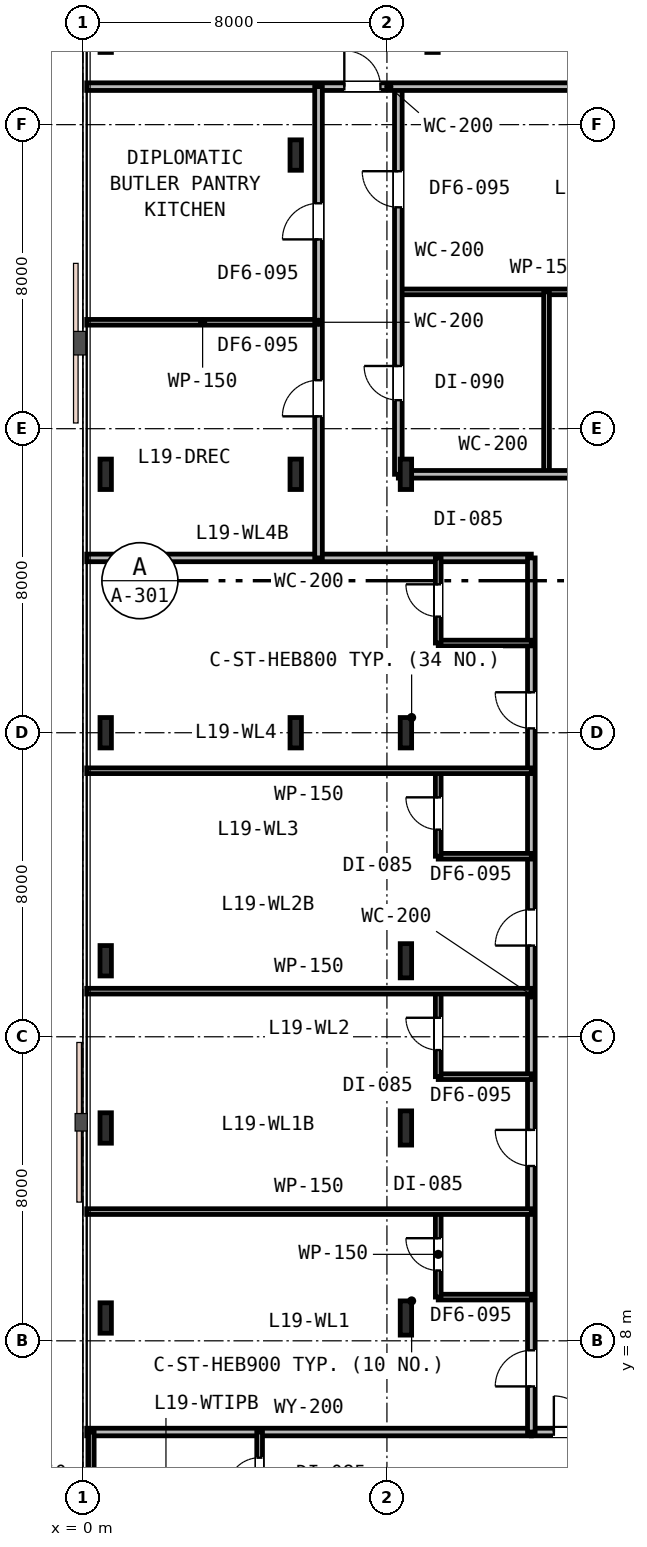
"""IFC4 building model, lengths in metres.
Left out: names, types, materials, properties, quantities, classifications, styles, units other than length and angle.
Written with IfcOpenShell. Run it as: python <this file> out.ifc"""

import sys

from ifc_helpers import new_model, si_unit, direction, frame, frame_2d, origin, origin_2d, place, context, subcontext, project, spatial, rectangle, i_section, extrude, element, fill, save


model = new_model("IFC4")
c1 = context("Model", 3, precision=1e-05, world=origin(), true_north=direction((0.0, 1.0)))
c2 = subcontext(c1, "Body", "Model", "MODEL_VIEW")
j1 = project(units=[si_unit("LENGTHUNIT", "METRE"), si_unit("PLANEANGLEUNIT", "RADIAN")], contexts=[c1])
p1 = place(None, origin())
s1 = spatial("IfcSite", under=j1, at=p1, CompositionType="ELEMENT")
p2 = place(p1, origin())
s2 = spatial("IfcBuilding", under=s1, at=p2, CompositionType="ELEMENT")
p3 = place(p2, frame((0.0, 0.0, 76.2)))
s3 = spatial("IfcBuildingStorey", under=s2, at=p3, CompositionType="ELEMENT", Elevation=76.2)
for number, where, z_axis, x_axis in (
    (1, (8.5, 24.0, 0.0), (0.0, 0.0, 1.0), (1.0, 0.0, 0.0)),
    (2, (5.6, 24.0, 0.0), (0.0, 0.0, 1.0), (1.0, 0.0, 0.0)),
    (3, (5.6, 30.8, 0.0), (0.0, 0.0, 1.0), (1.0, 0.0, 0.0)),
    (4, (5.6, 39.2, 0.0), (0.0, 0.0, 1.0), (1.0, 0.0, 0.0)),
    (5, (8.5, 30.8, 0.0), (0.0, 0.0, 1.0), (1.0, 0.0, 0.0)),
    (6, (9.2, 42.3, 0.0), (0.0, 0.0, 1.0), (1.0, 0.0, 0.0)),
    (7, (0.6, 24.0, 0.0), (0.0, 0.0, 1.0), (1.0, 0.0, 0.0)),
    (8, (0.6, 30.8, 0.0), (0.0, 0.0, 1.0), (1.0, 0.0, 0.0)),
    (9, (0.6, 42.3, 0.0), (0.0, 0.0, 1.0), (1.0, 0.0, 0.0)),
    (10, (0.6, 8.6, 0.0), (0.0, 0.0, 1.0), (1.0, 0.0, 0.0)),
    (11, (0.6, 13.6, 0.0), (0.0, 0.0, 1.0), (1.0, 0.0, 0.0)),
    (12, (0.6, 18.0, 0.0), (0.0, 0.0, 1.0), (1.0, 0.0, 0.0)),
):
    element("IfcColumn", number, at=place(p3, frame(where, z_axis=z_axis, x_axis=x_axis)), inside=s3, PredefinedType="COLUMN", context=c2, shape_type="SweptSolid", body=[
        extrude(i_section(OverallWidth=0.3, OverallDepth=0.8, WebThickness=0.018, FlangeThickness=0.033, FilletRadius=0.03, at=origin_2d()), origin(), (0.0, 0.0, 1.0), 3.6),
    ])
for number, where, z_axis, x_axis in (
    (13, (8.5, 8.6, 0.0), (0.0, 0.0, 1.0), (1.0, 0.0, 0.0)),
    (14, (8.5, 13.6, 0.0), (0.0, 0.0, 1.0), (1.0, 0.0, 0.0)),
    (15, (8.5, 18.0, 0.0), (0.0, 0.0, 1.0), (1.0, 0.0, 0.0)),
):
    element("IfcColumn", number, at=place(p3, frame(where, z_axis=z_axis, x_axis=x_axis)), inside=s3, PredefinedType="COLUMN", context=c2, shape_type="SweptSolid", body=[
        extrude(i_section(OverallWidth=0.3, OverallDepth=0.9, WebThickness=0.018, FlangeThickness=0.035, FilletRadius=0.03, at=origin_2d()), origin(), (0.0, 0.0, 1.0), 3.6),
    ])
p4 = place(p3, frame((0.1, 28.6, 0.0), z_axis=(0.0, 0.0, 1.0), x_axis=(1.0, 0.0, 0.0)))
e16 = element("IfcWall", 16, at=p4, inside=s3, PredefinedType="PARTITIONING", context=c2, shape_type="SweptSolid", body=[
    extrude(rectangle(XDim=11.7, YDim=0.2, at=frame_2d((5.85, 0.0))), origin(), (0.0, 0.0, 1.0), 2.74),
])
p5 = place(p3, frame((8.3, 35.6, 0.0), z_axis=(0.0, 0.0, 1.0), x_axis=(1.0, 0.0, 0.0)))
e17 = element("IfcWall", 17, at=p5, inside=s3, PredefinedType="PARTITIONING", context=c2, shape_type="SweptSolid", body=[
    extrude(rectangle(XDim=7.7, YDim=0.15, at=frame_2d((3.85, 0.0))), origin(), (0.0, 0.0, 1.0), 2.74),
])
p6 = place(p3, frame((12.2, 30.8, 0.0), z_axis=(0.0, 0.0, 1.0), x_axis=(0.0, 1.0, 0.0)))
e18 = element("IfcWall", 18, at=p6, inside=s3, PredefinedType="PARTITIONING", context=c2, shape_type="SweptSolid", body=[
    extrude(rectangle(XDim=4.8, YDim=0.15, at=frame_2d((2.4, 0.0))), origin(), (0.0, 0.0, 1.0), 2.74),
])
p7 = place(p3, frame((8.3, 30.8, 0.0), z_axis=(0.0, 0.0, 1.0), x_axis=(1.0, 0.0, 0.0)))
e19 = element("IfcWall", 19, at=p7, inside=s3, PredefinedType="PARTITIONING", context=c2, shape_type="SweptSolid", body=[
    extrude(rectangle(XDim=7.7, YDim=0.2, at=frame_2d((3.85, 0.0))), origin(), (0.0, 0.0, 1.0), 2.74),
])
p8 = place(p7, frame((5.325, 0.0, 0.0)))
e20 = element("IfcOpeningElement", 20, at=p8, cuts=e19, PredefinedType="OPENING", context=c2, shape_type="SweptSolid", body=[
    extrude(rectangle(XDim=0.95, YDim=2.15, at=frame_2d((0.475, 1.075))), frame((0.0, 0.11, 0.0), z_axis=(0.0, -1.0, 0.0), x_axis=(1.0, 0.0, 0.0)), (0.0, 0.0, 1.0), 0.22),
])
p9 = place(p3, frame((8.3, 30.8, 0.0), z_axis=(0.0, 0.0, 1.0), x_axis=(0.0, 1.0, 0.0)))
e21 = element("IfcWall", 21, at=p9, inside=s3, PredefinedType="PARTITIONING", context=c2, shape_type="SweptSolid", body=[
    extrude(rectangle(XDim=10.2, YDim=0.2, at=frame_2d((5.1, 0.0))), origin(), (0.0, 0.0, 1.0), 2.74),
])
p10 = place(p9, frame((1.95, 0.0, 0.0)))
e22 = element("IfcOpeningElement", 22, at=p10, cuts=e21, PredefinedType="OPENING", context=c2, shape_type="SweptSolid", body=[
    extrude(rectangle(XDim=0.9, YDim=2.15, at=frame_2d((0.45, 1.075))), frame((0.0, 0.11, 0.0), z_axis=(0.0, -1.0, 0.0), x_axis=(1.0, 0.0, 0.0)), (0.0, 0.0, 1.0), 0.22),
])
p11 = place(p9, frame((7.025, 0.0, 0.0)))
e23 = element("IfcOpeningElement", 23, at=p11, cuts=e21, PredefinedType="OPENING", context=c2, shape_type="SweptSolid", body=[
    extrude(rectangle(XDim=0.95, YDim=2.15, at=frame_2d((0.475, 1.075))), frame((0.0, 0.11, 0.0), z_axis=(0.0, -1.0, 0.0), x_axis=(1.0, 0.0, 0.0)), (0.0, 0.0, 1.0), 0.22),
])
p12 = place(p3, frame((0.1, 41.0, 0.0), z_axis=(0.0, 0.0, 1.0), x_axis=(1.0, 0.0, 0.0)))
e24 = element("IfcWall", 24, at=p12, inside=s3, PredefinedType="PARTITIONING", context=c2, shape_type="SweptSolid", body=[
    extrude(rectangle(XDim=15.9, YDim=0.2, at=frame_2d((7.95, 0.0))), origin(), (0.0, 0.0, 1.0), 2.74),
])
p13 = place(p12, frame((6.779, 0.0, 0.0)))
e25 = element("IfcOpeningElement", 25, at=p13, cuts=e24, PredefinedType="OPENING", context=c2, shape_type="SweptSolid", body=[
    extrude(rectangle(XDim=0.95, YDim=2.15, at=frame_2d((0.475, 1.075))), frame((0.0, 0.11, 0.0), z_axis=(0.0, -1.0, 0.0), x_axis=(1.0, 0.0, 0.0)), (0.0, 0.0, 1.0), 0.22),
])
p14 = place(p3, frame((0.1, 34.8, 0.0), z_axis=(0.0, 0.0, 1.0), x_axis=(1.0, 0.0, 0.0)))
e26 = element("IfcWall", 26, at=p14, inside=s3, PredefinedType="PARTITIONING", context=c2, shape_type="SweptSolid", body=[
    extrude(rectangle(XDim=6.1, YDim=0.15, at=frame_2d((3.05, 0.0))), origin(), (0.0, 0.0, 1.0), 2.74),
])
p15 = place(p3, frame((6.2, 28.6, 0.0), z_axis=(0.0, 0.0, 1.0), x_axis=(0.0, 1.0, 0.0)))
e27 = element("IfcWall", 27, at=p15, inside=s3, PredefinedType="PARTITIONING", context=c2, shape_type="SweptSolid", body=[
    extrude(rectangle(XDim=12.4, YDim=0.2, at=frame_2d((6.2, 0.0))), origin(), (0.0, 0.0, 1.0), 2.74),
])
p16 = place(p15, frame((3.725, 0.0, 0.0)))
e28 = element("IfcOpeningElement", 28, at=p16, cuts=e27, PredefinedType="OPENING", context=c2, shape_type="SweptSolid", body=[
    extrude(rectangle(XDim=0.95, YDim=2.15, at=frame_2d((0.475, 1.075))), frame((0.0, 0.11, 0.0), z_axis=(0.0, -1.0, 0.0), x_axis=(1.0, 0.0, 0.0)), (0.0, 0.0, 1.0), 0.22),
])
p17 = place(p15, frame((8.381, 0.0, 0.0)))
e29 = element("IfcOpeningElement", 29, at=p17, cuts=e27, PredefinedType="OPENING", context=c2, shape_type="SweptSolid", body=[
    extrude(rectangle(XDim=0.95, YDim=2.15, at=frame_2d((0.475, 1.075))), frame((0.0, 0.11, 0.0), z_axis=(0.0, -1.0, 0.0), x_axis=(1.0, 0.0, 0.0)), (0.0, 0.0, 1.0), 0.22),
])
p18 = place(p3, frame((0.1, 5.6, 0.0), z_axis=(0.0, 0.0, 1.0), x_axis=(1.0, 0.0, 0.0)))
e30 = element("IfcWall", 30, at=p18, inside=s3, PredefinedType="PARTITIONING", context=c2, shape_type="SweptSolid", body=[
    extrude(rectangle(XDim=11.7, YDim=0.2, at=frame_2d((5.85, 0.0))), origin(), (0.0, 0.0, 1.0), 2.83),
])
p19 = place(p3, frame((11.8, 5.6, 0.0), z_axis=(0.0, 0.0, 1.0), x_axis=(1.0, 0.0, 0.0)))
e31 = element("IfcWall", 31, at=p19, inside=s3, PredefinedType="PARTITIONING", context=c2, shape_type="SweptSolid", body=[
    extrude(rectangle(XDim=2.2, YDim=0.2, at=frame_2d((1.1, 0.0))), origin(), (0.0, 0.0, 1.0), 3.24),
])
p20 = place(p19, frame((0.593, 0.0, 0.0)))
e32 = element("IfcOpeningElement", 32, at=p20, cuts=e31, PredefinedType="OPENING", context=c2, shape_type="SweptSolid", body=[
    extrude(rectangle(XDim=0.95, YDim=2.15, at=frame_2d((0.475, 1.075))), frame((0.0, 0.11, 0.0), z_axis=(0.0, -1.0, 0.0), x_axis=(1.0, 0.0, 0.0)), (0.0, 0.0, 1.0), 0.22),
])
p21 = place(p3, frame((4.65, 3.4, 0.0), z_axis=(0.0, 0.0, 1.0), x_axis=(0.0, 1.0, 0.0)))
e33 = element("IfcWall", 33, at=p21, inside=s3, PredefinedType="PARTITIONING", context=c2, shape_type="SweptSolid", body=[
    extrude(rectangle(XDim=2.2, YDim=0.15, at=frame_2d((1.1, 0.0))), origin(), (0.0, 0.0, 1.0), 3.24),
])
p22 = place(p21, frame((0.675, 0.0, 0.0)))
e34 = element("IfcOpeningElement", 34, at=p22, cuts=e33, PredefinedType="OPENING", context=c2, shape_type="SweptSolid", body=[
    extrude(rectangle(XDim=0.85, YDim=2.15, at=frame_2d((0.425, 1.075))), frame((0.0, 0.085, 0.0), z_axis=(0.0, -1.0, 0.0), x_axis=(1.0, 0.0, 0.0)), (0.0, 0.0, 1.0), 0.17),
])
p23 = place(p3, frame((0.22, 3.38, 0.0), z_axis=(0.0, 0.0, 1.0), x_axis=(0.0, 1.0, 0.0)))
e35 = element("IfcWall", 35, at=p23, inside=s3, PredefinedType="PARTITIONING", context=c2, shape_type="SweptSolid", body=[
    extrude(rectangle(XDim=2.22, YDim=0.15, at=frame_2d((1.11, 0.0))), origin(), (0.0, 0.0, 1.0), 2.83),
])
p24 = place(p3, frame((11.8, 5.6, 0.0), z_axis=(0.0, 0.0, 1.0), x_axis=(0.0, 1.0, 0.0)))
e36 = element("IfcWall", 36, at=p24, inside=s3, PredefinedType="PARTITIONING", context=c2, shape_type="SweptSolid", body=[
    extrude(rectangle(XDim=23.0, YDim=0.2, at=frame_2d((11.5, 0.0))), origin(), (0.0, 0.0, 1.0), 2.74),
])
p25 = place(p24, frame((1.2, 0.0, 0.0)))
e37 = element("IfcOpeningElement", 37, at=p25, cuts=e36, PredefinedType="OPENING", context=c2, shape_type="SweptSolid", body=[
    extrude(rectangle(XDim=0.95, YDim=2.15, at=frame_2d((0.475, 1.075))), frame((0.0, 0.11, 0.0), z_axis=(0.0, -1.0, 0.0), x_axis=(1.0, 0.0, 0.0)), (0.0, 0.0, 1.0), 0.22),
])
p26 = place(p24, frame((7.0, 0.0, 0.0)))
e38 = element("IfcOpeningElement", 38, at=p26, cuts=e36, PredefinedType="OPENING", context=c2, shape_type="SweptSolid", body=[
    extrude(rectangle(XDim=0.95, YDim=2.15, at=frame_2d((0.475, 1.075))), frame((0.0, 0.11, 0.0), z_axis=(0.0, -1.0, 0.0), x_axis=(1.0, 0.0, 0.0)), (0.0, 0.0, 1.0), 0.22),
])
p27 = place(p24, frame((12.8, 0.0, 0.0)))
e39 = element("IfcOpeningElement", 39, at=p27, cuts=e36, PredefinedType="OPENING", context=c2, shape_type="SweptSolid", body=[
    extrude(rectangle(XDim=0.95, YDim=2.15, at=frame_2d((0.475, 1.075))), frame((0.0, 0.11, 0.0), z_axis=(0.0, -1.0, 0.0), x_axis=(1.0, 0.0, 0.0)), (0.0, 0.0, 1.0), 0.22),
])
p28 = place(p24, frame((18.515, 0.0, 0.0)))
e40 = element("IfcOpeningElement", 40, at=p28, cuts=e36, PredefinedType="OPENING", context=c2, shape_type="SweptSolid", body=[
    extrude(rectangle(XDim=0.95, YDim=2.15, at=frame_2d((0.475, 1.075))), frame((0.0, 0.11, 0.0), z_axis=(0.0, -1.0, 0.0), x_axis=(1.0, 0.0, 0.0)), (0.0, 0.0, 1.0), 0.22),
])
p29 = place(p3, frame((9.35, 9.15, 0.0), z_axis=(0.0, 0.0, 1.0), x_axis=(1.0, 0.0, 0.0)))
e41 = element("IfcWall", 41, at=p29, inside=s3, PredefinedType="PARTITIONING", context=c2, shape_type="SweptSolid", body=[
    extrude(rectangle(XDim=2.45, YDim=0.15, at=frame_2d((1.225, 0.0))), origin(), (0.0, 0.0, 1.0), 2.93),
])
p30 = place(p3, frame((9.35, 9.15, 0.0), z_axis=(0.0, 0.0, 1.0), x_axis=(0.0, 1.0, 0.0)))
e42 = element("IfcWall", 42, at=p30, inside=s3, PredefinedType="PARTITIONING", context=c2, shape_type="SweptSolid", body=[
    extrude(rectangle(XDim=2.25, YDim=0.15, at=frame_2d((1.125, 0.0))), origin(), (0.0, 0.0, 1.0), 3.24),
])
p31 = place(p30, frame((0.7, 0.0, 0.0)))
e43 = element("IfcOpeningElement", 43, at=p31, cuts=e42, PredefinedType="OPENING", context=c2, shape_type="SweptSolid", body=[
    extrude(rectangle(XDim=0.85, YDim=2.15, at=frame_2d((0.425, 1.075))), frame((0.0, 0.085, 0.0), z_axis=(0.0, -1.0, 0.0), x_axis=(1.0, 0.0, 0.0)), (0.0, 0.0, 1.0), 0.17),
])
p32 = place(p3, frame((0.1, 11.4, 0.0), z_axis=(0.0, 0.0, 1.0), x_axis=(1.0, 0.0, 0.0)))
e44 = element("IfcWall", 44, at=p32, inside=s3, PredefinedType="PARTITIONING", context=c2, shape_type="SweptSolid", body=[
    extrude(rectangle(XDim=11.7, YDim=0.15, at=frame_2d((5.85, 0.0))), origin(), (0.0, 0.0, 1.0), 2.74),
])
p33 = place(p3, frame((9.35, 14.95, 0.0), z_axis=(0.0, 0.0, 1.0), x_axis=(1.0, 0.0, 0.0)))
e45 = element("IfcWall", 45, at=p33, inside=s3, PredefinedType="PARTITIONING", context=c2, shape_type="SweptSolid", body=[
    extrude(rectangle(XDim=2.45, YDim=0.15, at=frame_2d((1.225, 0.0))), origin(), (0.0, 0.0, 1.0), 2.93),
])
p34 = place(p3, frame((9.35, 14.95, 0.0), z_axis=(0.0, 0.0, 1.0), x_axis=(0.0, 1.0, 0.0)))
e46 = element("IfcWall", 46, at=p34, inside=s3, PredefinedType="PARTITIONING", context=c2, shape_type="SweptSolid", body=[
    extrude(rectangle(XDim=2.25, YDim=0.15, at=frame_2d((1.125, 0.0))), origin(), (0.0, 0.0, 1.0), 3.24),
])
p35 = place(p34, frame((0.7, 0.0, 0.0)))
e47 = element("IfcOpeningElement", 47, at=p35, cuts=e46, PredefinedType="OPENING", context=c2, shape_type="SweptSolid", body=[
    extrude(rectangle(XDim=0.85, YDim=2.15, at=frame_2d((0.425, 1.075))), frame((0.0, 0.085, 0.0), z_axis=(0.0, -1.0, 0.0), x_axis=(1.0, 0.0, 0.0)), (0.0, 0.0, 1.0), 0.17),
])
p36 = place(p3, frame((0.1, 17.2, 0.0), z_axis=(0.0, 0.0, 1.0), x_axis=(1.0, 0.0, 0.0)))
e48 = element("IfcWall", 48, at=p36, inside=s3, PredefinedType="PARTITIONING", context=c2, shape_type="SweptSolid", body=[
    extrude(rectangle(XDim=11.7, YDim=0.15, at=frame_2d((5.85, 0.0))), origin(), (0.0, 0.0, 1.0), 2.74),
])
p37 = place(p3, frame((9.35, 20.75, 0.0), z_axis=(0.0, 0.0, 1.0), x_axis=(1.0, 0.0, 0.0)))
e49 = element("IfcWall", 49, at=p37, inside=s3, PredefinedType="PARTITIONING", context=c2, shape_type="SweptSolid", body=[
    extrude(rectangle(XDim=2.45, YDim=0.15, at=frame_2d((1.225, 0.0))), origin(), (0.0, 0.0, 1.0), 3.24),
])
p38 = place(p3, frame((9.35, 20.75, 0.0), z_axis=(0.0, 0.0, 1.0), x_axis=(0.0, 1.0, 0.0)))
e50 = element("IfcWall", 50, at=p38, inside=s3, PredefinedType="PARTITIONING", context=c2, shape_type="SweptSolid", body=[
    extrude(rectangle(XDim=2.25, YDim=0.15, at=frame_2d((1.125, 0.0))), origin(), (0.0, 0.0, 1.0), 3.24),
])
p39 = place(p38, frame((0.7, 0.0, 0.0)))
e51 = element("IfcOpeningElement", 51, at=p39, cuts=e50, PredefinedType="OPENING", context=c2, shape_type="SweptSolid", body=[
    extrude(rectangle(XDim=0.85, YDim=2.15, at=frame_2d((0.425, 1.075))), frame((0.0, 0.085, 0.0), z_axis=(0.0, -1.0, 0.0), x_axis=(1.0, 0.0, 0.0)), (0.0, 0.0, 1.0), 0.17),
])
p40 = place(p3, frame((0.1, 23.0, 0.0), z_axis=(0.0, 0.0, 1.0), x_axis=(1.0, 0.0, 0.0)))
e52 = element("IfcWall", 52, at=p40, inside=s3, PredefinedType="PARTITIONING", context=c2, shape_type="SweptSolid", body=[
    extrude(rectangle(XDim=11.7, YDim=0.15, at=frame_2d((5.85, 0.0))), origin(), (0.0, 0.0, 1.0), 2.74),
])
p41 = place(p3, frame((9.35, 26.36, 0.0), z_axis=(0.0, 0.0, 1.0), x_axis=(1.0, 0.0, 0.0)))
e53 = element("IfcWall", 53, at=p41, inside=s3, PredefinedType="PARTITIONING", context=c2, shape_type="SweptSolid", body=[
    extrude(rectangle(XDim=2.45, YDim=0.15, at=frame_2d((1.225, 0.0))), origin(), (0.0, 0.0, 1.0), 3.24),
])
p42 = place(p3, frame((9.35, 26.36, 0.0), z_axis=(0.0, 0.0, 1.0), x_axis=(0.0, 1.0, 0.0)))
e54 = element("IfcWall", 54, at=p42, inside=s3, PredefinedType="PARTITIONING", context=c2, shape_type="SweptSolid", body=[
    extrude(rectangle(XDim=2.24, YDim=0.15, at=frame_2d((1.12, 0.0))), origin(), (0.0, 0.0, 1.0), 3.24),
])
p43 = place(p42, frame((0.695, 0.0, 0.0)))
e55 = element("IfcOpeningElement", 55, at=p43, cuts=e54, PredefinedType="OPENING", context=c2, shape_type="SweptSolid", body=[
    extrude(rectangle(XDim=0.85, YDim=2.15, at=frame_2d((0.425, 1.075))), frame((0.0, 0.085, 0.0), z_axis=(0.0, -1.0, 0.0), x_axis=(1.0, 0.0, 0.0)), (0.0, 0.0, 1.0), 0.17),
])
p44 = place(p10, origin())
e56 = element("IfcDoor", 56, at=p44, inside=s3, OperationType="SINGLE_SWING_RIGHT", PredefinedType="DOOR", context=c2, shape_type="SweptSolid", body=[
    extrude(rectangle(XDim=0.9, YDim=2.15, at=frame_2d((0.45, 1.075))), frame((0.0, 0.025, 0.0), z_axis=(0.0, -1.0, 0.0), x_axis=(1.0, 0.0, 0.0)), (0.0, 0.0, 1.0), 0.05),
])
fill(e22, e56)
p45 = place(p13, origin())
e57 = element("IfcDoor", 57, at=p45, inside=s3, OperationType="SINGLE_SWING_LEFT", PredefinedType="DOOR", context=c2, shape_type="SweptSolid", body=[
    extrude(rectangle(XDim=0.95, YDim=2.15, at=frame_2d((0.475, 1.075))), frame((0.0, 0.025, 0.0), z_axis=(0.0, -1.0, 0.0), x_axis=(1.0, 0.0, 0.0)), (0.0, 0.0, 1.0), 0.05),
])
fill(e25, e57)
p46 = place(p16, origin())
e58 = element("IfcDoor", 58, at=p46, inside=s3, OperationType="SINGLE_SWING_LEFT", PredefinedType="DOOR", context=c2, shape_type="SweptSolid", body=[
    extrude(rectangle(XDim=0.95, YDim=2.15, at=frame_2d((0.475, 1.075))), frame((0.0, 0.025, 0.0), z_axis=(0.0, -1.0, 0.0), x_axis=(1.0, 0.0, 0.0)), (0.0, 0.0, 1.0), 0.05),
])
fill(e28, e58)
p47 = place(p17, origin())
e59 = element("IfcDoor", 59, at=p47, inside=s3, OperationType="SINGLE_SWING_LEFT", PredefinedType="DOOR", context=c2, shape_type="SweptSolid", body=[
    extrude(rectangle(XDim=0.95, YDim=2.15, at=frame_2d((0.475, 1.075))), frame((0.0, 0.025, 0.0), z_axis=(0.0, -1.0, 0.0), x_axis=(1.0, 0.0, 0.0)), (0.0, 0.0, 1.0), 0.05),
])
fill(e29, e59)
p48 = place(p11, origin())
e60 = element("IfcDoor", 60, at=p48, inside=s3, OperationType="SINGLE_SWING_RIGHT", PredefinedType="DOOR", context=c2, shape_type="SweptSolid", body=[
    extrude(rectangle(XDim=0.95, YDim=2.15, at=frame_2d((0.475, 1.075))), frame((0.0, 0.025, 0.0), z_axis=(0.0, -1.0, 0.0), x_axis=(1.0, 0.0, 0.0)), (0.0, 0.0, 1.0), 0.05),
])
fill(e23, e60)
p49 = place(p20, origin())
e61 = element("IfcDoor", 61, at=p49, inside=s3, OperationType="SINGLE_SWING_LEFT", PredefinedType="DOOR", context=c2, shape_type="SweptSolid", body=[
    extrude(rectangle(XDim=0.95, YDim=2.15, at=frame_2d((0.475, 1.075))), frame((0.0, 0.025, 0.0), z_axis=(0.0, -1.0, 0.0), x_axis=(1.0, 0.0, 0.0)), (0.0, 0.0, 1.0), 0.05),
])
fill(e32, e61)
p50 = place(p22, origin())
e62 = element("IfcDoor", 62, at=p50, inside=s3, OperationType="SINGLE_SWING_LEFT", PredefinedType="DOOR", context=c2, shape_type="SweptSolid", body=[
    extrude(rectangle(XDim=0.85, YDim=2.15, at=frame_2d((0.425, 1.075))), frame((0.0, 0.025, 0.0), z_axis=(0.0, -1.0, 0.0), x_axis=(1.0, 0.0, 0.0)), (0.0, 0.0, 1.0), 0.05),
])
fill(e34, e62)
p51 = place(p25, origin())
e63 = element("IfcDoor", 63, at=p51, inside=s3, OperationType="SINGLE_SWING_LEFT", PredefinedType="DOOR", context=c2, shape_type="SweptSolid", body=[
    extrude(rectangle(XDim=0.95, YDim=2.15, at=frame_2d((0.475, 1.075))), frame((0.0, 0.025, 0.0), z_axis=(0.0, -1.0, 0.0), x_axis=(1.0, 0.0, 0.0)), (0.0, 0.0, 1.0), 0.05),
])
fill(e37, e63)
p52 = place(p31, origin())
e64 = element("IfcDoor", 64, at=p52, inside=s3, OperationType="SINGLE_SWING_RIGHT", PredefinedType="DOOR", context=c2, shape_type="SweptSolid", body=[
    extrude(rectangle(XDim=0.85, YDim=2.15, at=frame_2d((0.425, 1.075))), frame((0.0, 0.025, 0.0), z_axis=(0.0, -1.0, 0.0), x_axis=(1.0, 0.0, 0.0)), (0.0, 0.0, 1.0), 0.05),
])
fill(e43, e64)
p53 = place(p26, origin())
e65 = element("IfcDoor", 65, at=p53, inside=s3, OperationType="SINGLE_SWING_RIGHT", PredefinedType="DOOR", context=c2, shape_type="SweptSolid", body=[
    extrude(rectangle(XDim=0.95, YDim=2.15, at=frame_2d((0.475, 1.075))), frame((0.0, 0.025, 0.0), z_axis=(0.0, -1.0, 0.0), x_axis=(1.0, 0.0, 0.0)), (0.0, 0.0, 1.0), 0.05),
])
fill(e38, e65)
p54 = place(p35, origin())
e66 = element("IfcDoor", 66, at=p54, inside=s3, OperationType="SINGLE_SWING_RIGHT", PredefinedType="DOOR", context=c2, shape_type="SweptSolid", body=[
    extrude(rectangle(XDim=0.85, YDim=2.15, at=frame_2d((0.425, 1.075))), frame((0.0, 0.025, 0.0), z_axis=(0.0, -1.0, 0.0), x_axis=(1.0, 0.0, 0.0)), (0.0, 0.0, 1.0), 0.05),
])
fill(e47, e66)
p55 = place(p27, origin())
e67 = element("IfcDoor", 67, at=p55, inside=s3, OperationType="SINGLE_SWING_LEFT", PredefinedType="DOOR", context=c2, shape_type="SweptSolid", body=[
    extrude(rectangle(XDim=0.95, YDim=2.15, at=frame_2d((0.475, 1.075))), frame((0.0, 0.025, 0.0), z_axis=(0.0, -1.0, 0.0), x_axis=(1.0, 0.0, 0.0)), (0.0, 0.0, 1.0), 0.05),
])
fill(e39, e67)
p56 = place(p39, origin())
e68 = element("IfcDoor", 68, at=p56, inside=s3, OperationType="SINGLE_SWING_RIGHT", PredefinedType="DOOR", context=c2, shape_type="SweptSolid", body=[
    extrude(rectangle(XDim=0.85, YDim=2.15, at=frame_2d((0.425, 1.075))), frame((0.0, 0.025, 0.0), z_axis=(0.0, -1.0, 0.0), x_axis=(1.0, 0.0, 0.0)), (0.0, 0.0, 1.0), 0.05),
])
fill(e51, e68)
p57 = place(p28, origin())
e69 = element("IfcDoor", 69, at=p57, inside=s3, OperationType="SINGLE_SWING_RIGHT", PredefinedType="DOOR", context=c2, shape_type="SweptSolid", body=[
    extrude(rectangle(XDim=0.95, YDim=2.15, at=frame_2d((0.475, 1.075))), frame((0.0, 0.025, 0.0), z_axis=(0.0, -1.0, 0.0), x_axis=(1.0, 0.0, 0.0)), (0.0, 0.0, 1.0), 0.05),
])
fill(e40, e69)
p58 = place(p43, origin())
e70 = element("IfcDoor", 70, at=p58, inside=s3, OperationType="SINGLE_SWING_RIGHT", PredefinedType="DOOR", context=c2, shape_type="SweptSolid", body=[
    extrude(rectangle(XDim=0.85, YDim=2.15, at=frame_2d((0.425, 1.075))), frame((0.0, 0.025, 0.0), z_axis=(0.0, -1.0, 0.0), x_axis=(1.0, 0.0, 0.0)), (0.0, 0.0, 1.0), 0.05),
])
fill(e55, e70)
save(model, sys.argv[1])
